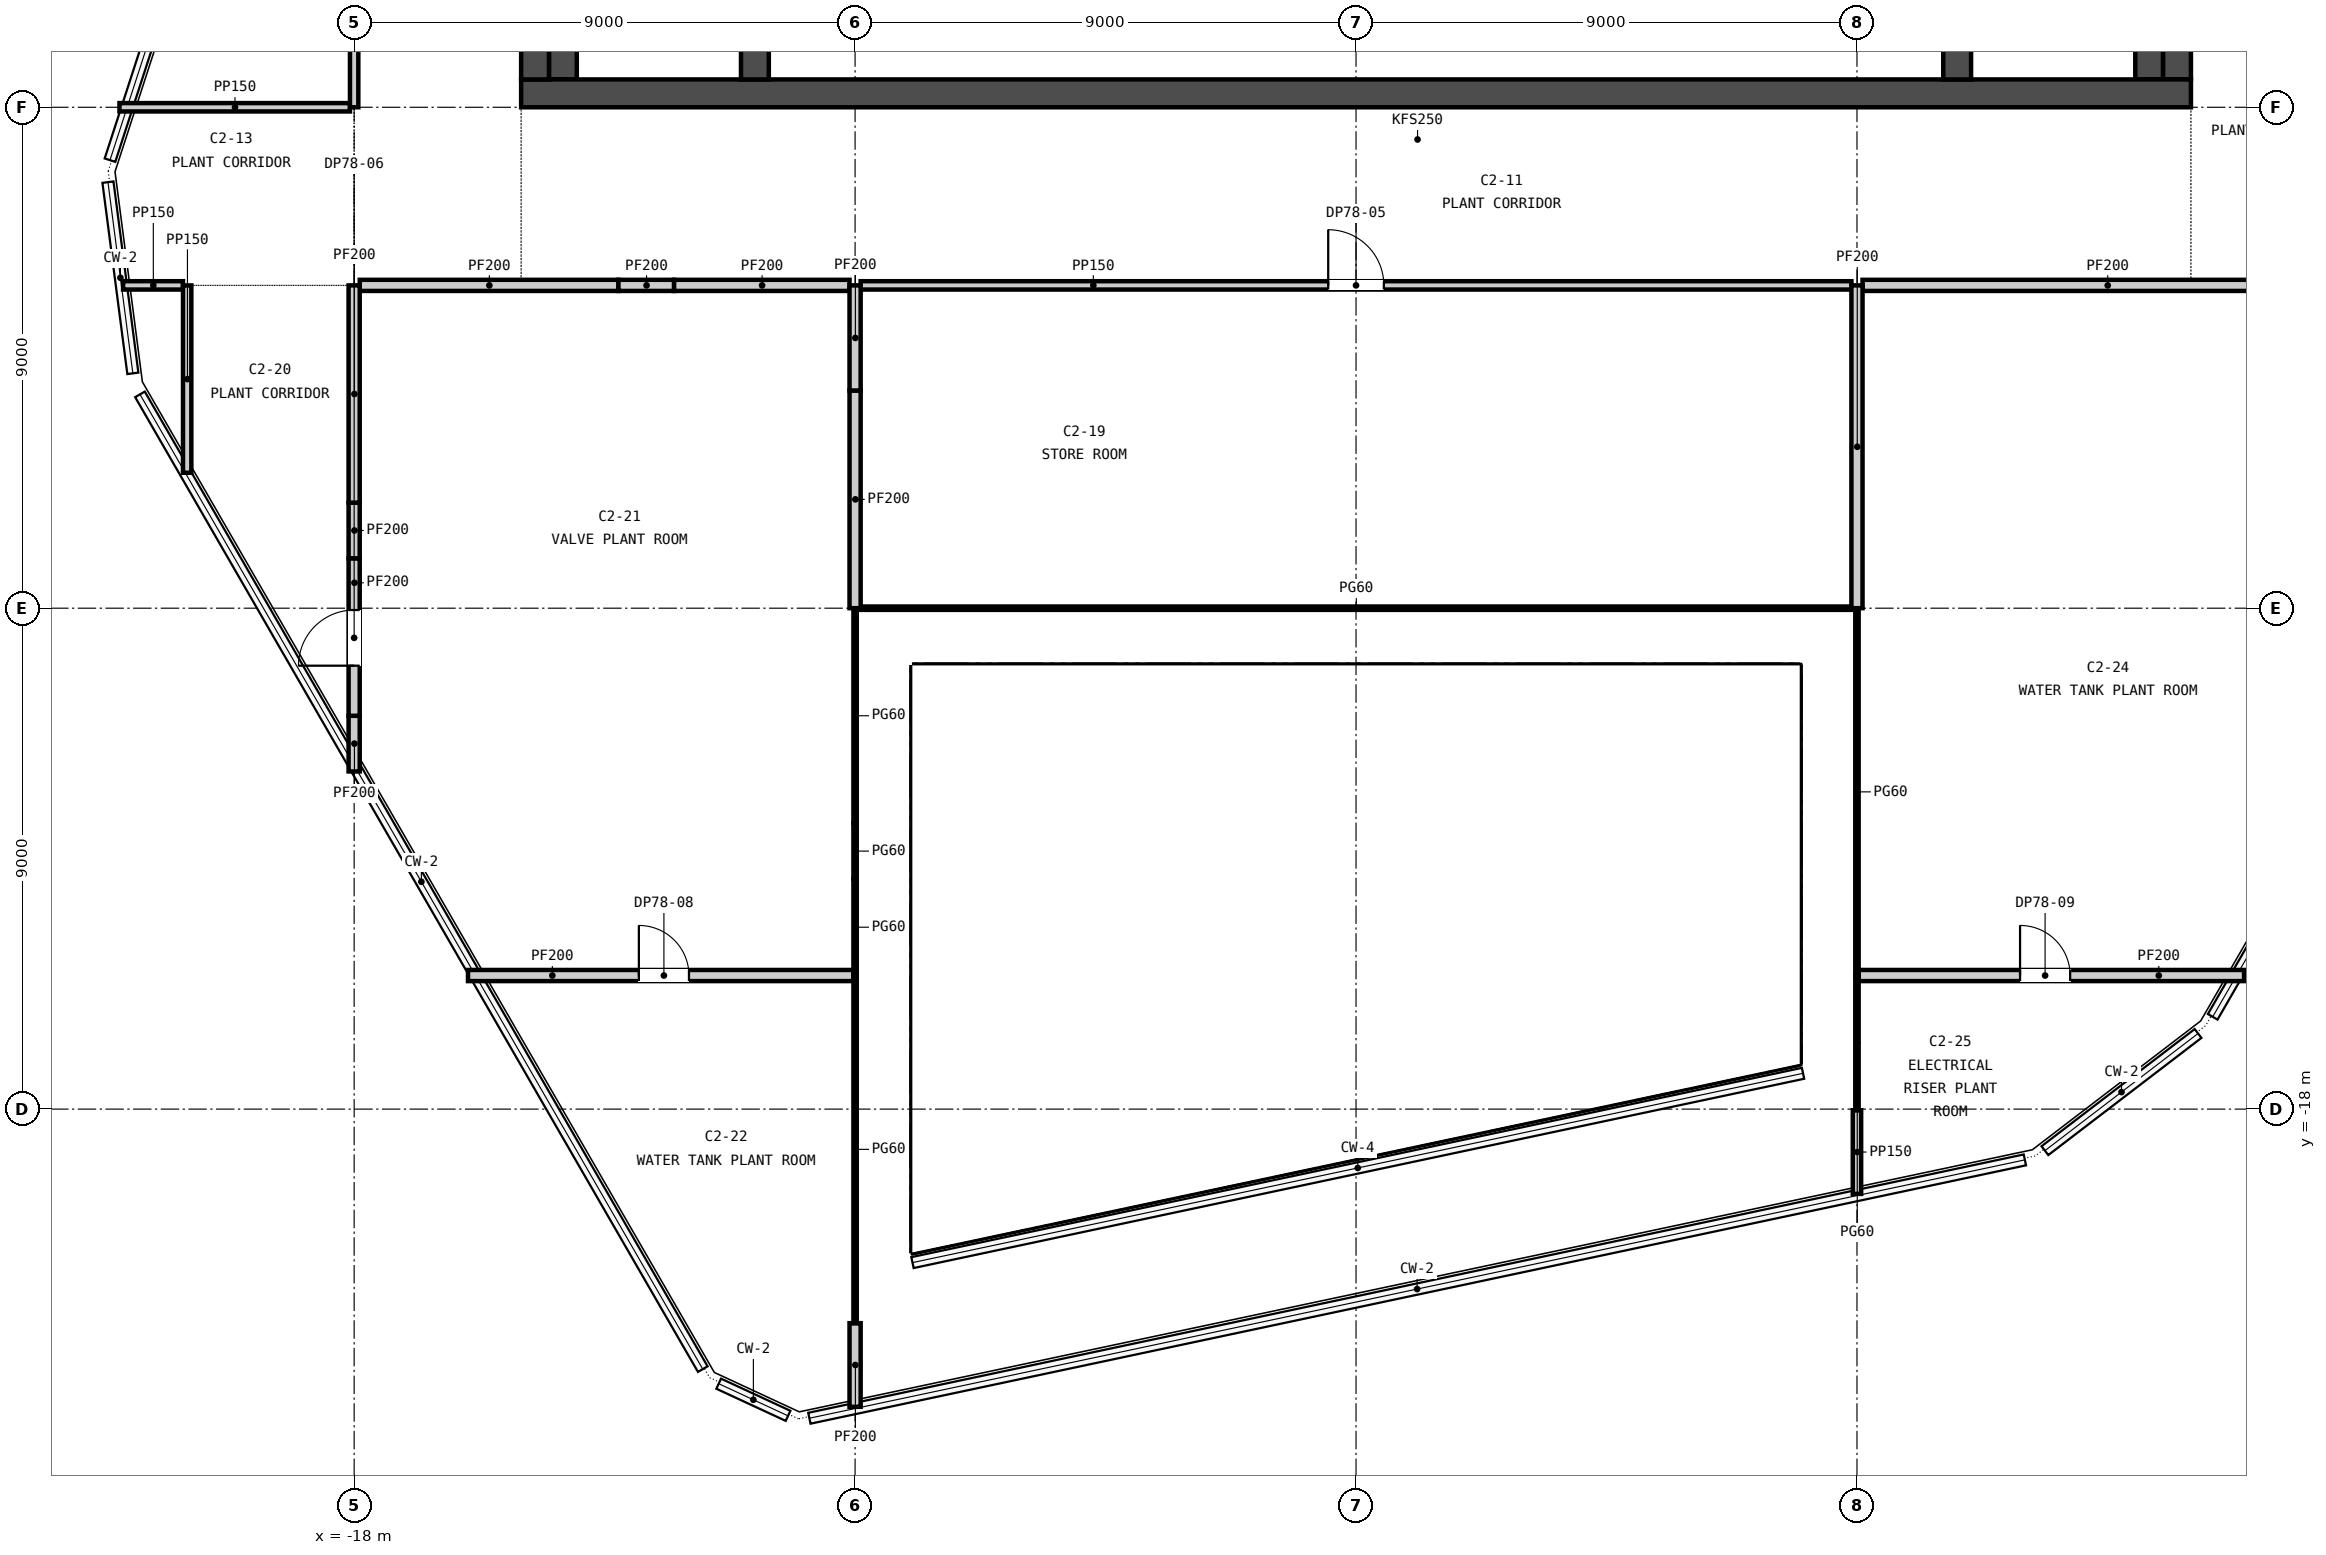
"""IFC4 building model, lengths in metres.
Left out: names, types, materials, properties, quantities, classifications, styles, units other than length and angle.
Written with IfcOpenShell. Run it as: python <this file> out.ifc"""

import sys

from ifc_helpers import new_model, si_unit, direction, frame, frame_2d, origin, place, context, subcontext, project, spatial, rectangle, extrude, element, fill, save


model = new_model("IFC4")
c1 = context("Model", 3, precision=1e-05, world=origin(), true_north=direction((0.0, 1.0)))
c2 = subcontext(c1, "Body", "Model", "MODEL_VIEW")
j1 = project(units=[si_unit("LENGTHUNIT", "METRE"), si_unit("PLANEANGLEUNIT", "RADIAN")], contexts=[c1])
p1 = place(None, origin())
s1 = spatial("IfcSite", under=j1, at=p1, CompositionType="ELEMENT")
p2 = place(p1, origin())
s2 = spatial("IfcBuilding", under=s1, at=p2, CompositionType="ELEMENT")
p3 = place(p2, frame((0.0, 0.0, 306.1)))
s3 = spatial("IfcBuildingStorey", under=s2, at=p3, CompositionType="ELEMENT", Elevation=306.1)
p4 = place(p3, frame((-15.0, 0.25, -0.25), z_axis=(0.0, 0.0, 1.0), x_axis=(1.0, 0.0, 0.0)))
e1 = element("IfcWall", 1, at=p4, inside=s3, PredefinedType="SOLIDWALL", context=c2, shape_type="SweptSolid", body=[
    extrude(rectangle(XDim=30.0, YDim=0.5, at=frame_2d((15.0, 0.0))), origin(), (0.0, 0.0, 1.0), 5.0),
])
for number, where, z_axis, x_axis in (
    (2, (-14.75, 0.5, -0.25), (0.0, 0.0, 1.0), (0.0, 1.0, 0.0)),
    (3, (14.75, 0.5, -0.25), (0.0, 0.0, 1.0), (0.0, 1.0, 0.0)),
    (4, (-10.8, 0.5, -0.25), (0.0, 0.0, 1.0), (0.0, 1.0, 0.0)),
    (5, (10.8, 0.5, -0.25), (0.0, 0.0, 1.0), (0.0, 1.0, 0.0)),
):
    element("IfcWall", number, at=place(p3, frame(where, z_axis=z_axis, x_axis=x_axis)), inside=s3, PredefinedType="SOLIDWALL", context=c2, shape_type="SweptSolid", body=[
        extrude(rectangle(XDim=14.0, YDim=0.5, at=frame_2d((7.0, 0.0))), origin(), (0.0, 0.0, 1.0), 5.0),
    ])
for number, where, z_axis, x_axis in (
    (6, (-14.25, 0.5, 0.0), (0.0, 0.0, 1.0), (0.0, 1.0, 0.0)),
    (7, (14.25, 0.5, 0.0), (0.0, 0.0, 1.0), (0.0, 1.0, 0.0)),
):
    element("IfcWall", number, at=place(p3, frame(where, z_axis=z_axis, x_axis=x_axis)), inside=s3, PredefinedType="SOLIDWALL", context=c2, shape_type="SweptSolid", body=[
        extrude(rectangle(XDim=14.0, YDim=0.5, at=frame_2d((7.0, 0.0))), origin(), (0.0, 0.0, 1.0), 4.75),
    ])
p5 = place(p3, frame((-15.955, -15.6, 0.0), z_axis=(0.0, 0.0, 1.0), x_axis=(1.0, 0.0, 0.0)))
e8 = element("IfcWall", 8, at=p5, inside=s3, PredefinedType="PARTITIONING", context=c2, shape_type="SweptSolid", body=[
    extrude(rectangle(XDim=6.925, YDim=0.2, at=frame_2d((3.462, 0.0))), origin(), (0.0, 0.0, 1.0), 4.75),
])
p6 = place(p5, frame((3.07, 0.0, 0.0)))
e9 = element("IfcOpeningElement", 9, at=p6, cuts=e8, PredefinedType="OPENING", context=c2, shape_type="SweptSolid", body=[
    extrude(rectangle(XDim=0.9, YDim=2.1, at=frame_2d((0.45, 1.05))), frame((0.0, 0.11, 0.0), z_axis=(0.0, -1.0, 0.0), x_axis=(1.0, 0.0, 0.0)), (0.0, 0.0, 1.0), 0.22),
])
p7 = place(p3, frame((9.03, -15.6, 0.0), z_axis=(0.0, 0.0, 1.0), x_axis=(1.0, 0.0, 0.0)))
e10 = element("IfcWall", 10, at=p7, inside=s3, PredefinedType="PARTITIONING", context=c2, shape_type="SweptSolid", body=[
    extrude(rectangle(XDim=6.925, YDim=0.2, at=frame_2d((3.462, 0.0))), origin(), (0.0, 0.0, 1.0), 4.75),
])
p8 = place(p7, frame((2.9, 0.0, 0.0)))
e11 = element("IfcOpeningElement", 11, at=p8, cuts=e10, PredefinedType="OPENING", context=c2, shape_type="SweptSolid", body=[
    extrude(rectangle(XDim=0.9, YDim=2.1, at=frame_2d((0.45, 1.05))), frame((0.0, 0.11, 0.0), z_axis=(0.0, -1.0, 0.0), x_axis=(1.0, 0.0, 0.0)), (0.0, 0.0, 1.0), 0.22),
])
p9 = place(p3, frame((-8.9, -9.0, 0.0), z_axis=(0.0, 0.0, 1.0), x_axis=(1.0, 0.0, 0.0)))
e12 = element("IfcWall", 12, at=p9, inside=s3, PredefinedType="PARTITIONING", context=c2, shape_type="SweptSolid", body=[
    extrude(rectangle(XDim=17.8, YDim=0.06, at=frame_2d((8.9, 0.0))), origin(), (0.0, 0.0, 1.0), 4.75),
])
p10 = place(p3, frame((-22.151, -3.2, 0.0), z_axis=(0.0, 0.0, 1.0), x_axis=(1.0, 0.0, 0.0)))
e13 = element("IfcWall", 13, at=p10, inside=s3, PredefinedType="PARTITIONING", context=c2, shape_type="SweptSolid", body=[
    extrude(rectangle(XDim=1.076, YDim=0.15, at=frame_2d((0.538, 0.0))), origin(), (0.0, 0.0, 1.0), 4.15),
])
p11 = place(p3, frame((-17.9, -3.2, 0.0), z_axis=(0.0, 0.0, 1.0), x_axis=(1.0, 0.0, 0.0)))
e14 = element("IfcWall", 14, at=p11, inside=s3, PredefinedType="PARTITIONING", context=c2, shape_type="SweptSolid", body=[
    extrude(rectangle(XDim=4.648, YDim=0.2, at=frame_2d((2.324, 0.0))), origin(), (0.0, 0.0, 1.0), 4.75),
])
p12 = place(p3, frame((-13.252, -3.2, 0.0), z_axis=(0.0, 0.0, 1.0), x_axis=(1.0, 0.0, 0.0)))
e15 = element("IfcWall", 15, at=p12, inside=s3, PredefinedType="PARTITIONING", context=c2, shape_type="SweptSolid", body=[
    extrude(rectangle(XDim=1.0, YDim=0.2, at=frame_2d((0.5, 0.0))), origin(), (0.0, 0.0, 1.0), 4.0),
])
p13 = place(p3, frame((-12.252, -3.2, 0.0), z_axis=(0.0, 0.0, 1.0), x_axis=(1.0, 0.0, 0.0)))
e16 = element("IfcWall", 16, at=p13, inside=s3, PredefinedType="PARTITIONING", context=c2, shape_type="SweptSolid", body=[
    extrude(rectangle(XDim=3.152, YDim=0.2, at=frame_2d((1.576, 0.0))), origin(), (0.0, 0.0, 1.0), 4.75),
])
p14 = place(p3, frame((-8.9, -3.2, 0.0), z_axis=(0.0, 0.0, 1.0), x_axis=(1.0, 0.0, 0.0)))
e17 = element("IfcWall", 17, at=p14, inside=s3, PredefinedType="PARTITIONING", context=c2, shape_type="SweptSolid", body=[
    extrude(rectangle(XDim=17.8, YDim=0.15, at=frame_2d((8.9, 0.0))), origin(), (0.0, 0.0, 1.0), 4.75),
])
p15 = place(p14, frame((8.4, 0.0, 0.0)))
e18 = element("IfcOpeningElement", 18, at=p15, cuts=e17, PredefinedType="OPENING", context=c2, shape_type="SweptSolid", body=[
    extrude(rectangle(XDim=1.0, YDim=2.1, at=frame_2d((0.5, 1.05))), frame((0.0, 0.085, 0.0), z_axis=(0.0, -1.0, 0.0), x_axis=(1.0, 0.0, 0.0)), (0.0, 0.0, 1.0), 0.17),
])
p16 = place(p3, frame((9.1, -3.2, 0.0), z_axis=(0.0, 0.0, 1.0), x_axis=(1.0, 0.0, 0.0)))
e19 = element("IfcWall", 19, at=p16, inside=s3, PredefinedType="PARTITIONING", context=c2, shape_type="SweptSolid", body=[
    extrude(rectangle(XDim=8.8, YDim=0.2, at=frame_2d((4.4, 0.0))), origin(), (0.0, 0.0, 1.0), 4.75),
])
p17 = place(p3, frame((-22.216, 0.0, 0.0), z_axis=(0.0, 0.0, 1.0), x_axis=(1.0, 0.0, 0.0)))
e20 = element("IfcWall", 20, at=p17, inside=s3, PredefinedType="PARTITIONING", context=c2, shape_type="SweptSolid", body=[
    extrude(rectangle(XDim=4.141, YDim=0.15, at=frame_2d((2.071, 0.0))), origin(), (0.0, 0.0, 1.0), 4.75),
])
p18 = place(p3, frame((-21.0, -6.567, 0.0), z_axis=(0.0, 0.0, 1.0), x_axis=(0.0, 1.0, 0.0)))
e21 = element("IfcWall", 21, at=p18, inside=s3, PredefinedType="PARTITIONING", context=c2, shape_type="SweptSolid", body=[
    extrude(rectangle(XDim=3.366, YDim=0.15, at=frame_2d((1.683, 0.0))), origin(), (0.0, 0.0, 1.0), 4.75),
])
p19 = place(p3, frame((-18.0, -11.933, 0.0), z_axis=(0.0, 0.0, 1.0), x_axis=(0.0, 1.0, 0.0)))
e22 = element("IfcWall", 22, at=p19, inside=s3, PredefinedType="PARTITIONING", context=c2, shape_type="SweptSolid", body=[
    extrude(rectangle(XDim=1.0, YDim=0.2, at=frame_2d((0.5, 0.0))), origin(), (0.0, 0.0, 1.0), 4.134),
])
p20 = place(p3, frame((-18.0, -10.933, 0.0), z_axis=(0.0, 0.0, 1.0), x_axis=(0.0, 1.0, 0.0)))
e23 = element("IfcWall", 23, at=p20, inside=s3, PredefinedType="PARTITIONING", context=c2, shape_type="SweptSolid", body=[
    extrude(rectangle(XDim=2.829, YDim=0.2, at=frame_2d((1.415, 0.0))), origin(), (0.0, 0.0, 1.0), 4.75),
])
p21 = place(p20, frame((0.9, 0.0, 0.0)))
e24 = element("IfcOpeningElement", 24, at=p21, cuts=e23, PredefinedType="OPENING", context=c2, shape_type="SweptSolid", body=[
    extrude(rectangle(XDim=1.0, YDim=2.1, at=frame_2d((0.5, 1.05))), frame((0.0, 0.11, 0.0), z_axis=(0.0, -1.0, 0.0), x_axis=(1.0, 0.0, 0.0)), (0.0, 0.0, 1.0), 0.22),
])
p22 = place(p3, frame((-18.0, -8.104, 0.0), z_axis=(0.0, 0.0, 1.0), x_axis=(0.0, 1.0, 0.0)))
e25 = element("IfcWall", 25, at=p22, inside=s3, PredefinedType="PARTITIONING", context=c2, shape_type="SweptSolid", body=[
    extrude(rectangle(XDim=1.0, YDim=0.2, at=frame_2d((0.5, 0.0))), origin(), (0.0, 0.0, 1.0), 4.0),
])
p23 = place(p3, frame((-18.0, -7.104, 0.0), z_axis=(0.0, 0.0, 1.0), x_axis=(0.0, 1.0, 0.0)))
e26 = element("IfcWall", 26, at=p23, inside=s3, PredefinedType="PARTITIONING", context=c2, shape_type="SweptSolid", body=[
    extrude(rectangle(XDim=3.904, YDim=0.2, at=frame_2d((1.952, 0.0))), origin(), (0.0, 0.0, 1.0), 4.75),
])
p24 = place(p3, frame((-18.0, 0.0, 0.0), z_axis=(0.0, 0.0, 1.0), x_axis=(0.0, 1.0, 0.0)))
e27 = element("IfcWall", 27, at=p24, inside=s3, PredefinedType="PARTITIONING", context=c2, shape_type="SweptSolid", body=[
    extrude(rectangle(XDim=11.624, YDim=0.15, at=frame_2d((5.812, 0.0))), origin(), (0.0, 0.0, 1.0), 4.75),
])
p25 = place(p24, frame((5.4, 0.0, 0.0)))
e28 = element("IfcOpeningElement", 28, at=p25, cuts=e27, PredefinedType="OPENING", context=c2, shape_type="SweptSolid", body=[
    extrude(rectangle(XDim=1.0, YDim=2.1, at=frame_2d((0.5, 1.05))), frame((0.0, 0.085, 0.0), z_axis=(0.0, -1.0, 0.0), x_axis=(1.0, 0.0, 0.0)), (0.0, 0.0, 1.0), 0.17),
])
p26 = place(p3, frame((-9.0, -23.349, 0.0), z_axis=(0.0, 0.0, 1.0), x_axis=(0.0, 1.0, 0.0)))
e29 = element("IfcWall", 29, at=p26, inside=s3, PredefinedType="PARTITIONING", context=c2, shape_type="SweptSolid", body=[
    extrude(rectangle(XDim=1.503, YDim=0.2, at=frame_2d((0.751, 0.0))), origin(), (0.0, 0.0, 1.0), 4.75),
])
p27 = place(p3, frame((-9.0, -21.846, 0.0), z_axis=(0.0, 0.0, 1.0), x_axis=(0.0, 1.0, 0.0)))
e30 = element("IfcWall", 30, at=p27, inside=s3, PredefinedType="PARTITIONING", context=c2, shape_type="SweptSolid", body=[
    extrude(rectangle(XDim=6.245, YDim=0.06, at=frame_2d((3.123, 0.0))), origin(), (0.0, 0.0, 1.0), 4.75),
])
p28 = place(p3, frame((-9.0, -15.599, 0.0), z_axis=(0.0, 0.0, 1.0), x_axis=(0.0, 1.0, 0.0)))
e31 = element("IfcWall", 31, at=p28, inside=s3, PredefinedType="PARTITIONING", context=c2, shape_type="SweptSolid", body=[
    extrude(rectangle(XDim=1.735, YDim=0.06, at=frame_2d((0.867, 0.0))), origin(), (0.0, 0.0, 1.0), 4.75),
])
p29 = place(p3, frame((-9.0, -13.864, 0.0), z_axis=(0.0, 0.0, 1.0), x_axis=(0.0, 1.0, 0.0)))
e32 = element("IfcWall", 32, at=p29, inside=s3, PredefinedType="PARTITIONING", context=c2, shape_type="SweptSolid", body=[
    extrude(rectangle(XDim=1.0, YDim=0.06, at=frame_2d((0.5, 0.0))), origin(), (0.0, 0.0, 1.0), 4.071),
])
p30 = place(p3, frame((-9.0, -12.864, 0.0), z_axis=(0.0, 0.0, 1.0), x_axis=(0.0, 1.0, 0.0)))
e33 = element("IfcWall", 33, at=p30, inside=s3, PredefinedType="PARTITIONING", context=c2, shape_type="SweptSolid", body=[
    extrude(rectangle(XDim=3.863, YDim=0.06, at=frame_2d((1.932, 0.0))), origin(), (0.0, 0.0, 1.0), 4.75),
])
p31 = place(p3, frame((-9.0, -9.0, 0.0), z_axis=(0.0, 0.0, 1.0), x_axis=(0.0, 1.0, 0.0)))
e34 = element("IfcWall", 34, at=p31, inside=s3, PredefinedType="PARTITIONING", context=c2, shape_type="SweptSolid", body=[
    extrude(rectangle(XDim=3.911, YDim=0.2, at=frame_2d((1.956, 0.0))), origin(), (0.0, 0.0, 1.0), 4.75),
])
p32 = place(p3, frame((-9.0, -5.089, 0.0), z_axis=(0.0, 0.0, 1.0), x_axis=(0.0, 1.0, 0.0)))
e35 = element("IfcWall", 35, at=p32, inside=s3, PredefinedType="PARTITIONING", context=c2, shape_type="SweptSolid", body=[
    extrude(rectangle(XDim=1.889, YDim=0.2, at=frame_2d((0.945, 0.0))), origin(), (0.0, 0.0, 1.0), 4.0),
])
p33 = place(p3, frame((9.0, -19.523, 0.0), z_axis=(0.0, 0.0, 1.0), x_axis=(0.0, 1.0, 0.0)))
e36 = element("IfcWall", 36, at=p33, inside=s3, PredefinedType="PARTITIONING", context=c2, shape_type="SweptSolid", body=[
    extrude(rectangle(XDim=1.503, YDim=0.15, at=frame_2d((0.751, 0.0))), origin(), (0.0, 0.0, 1.0), 4.75),
])
p34 = place(p3, frame((9.0, -18.02, 0.0), z_axis=(0.0, 0.0, 1.0), x_axis=(0.0, 1.0, 0.0)))
e37 = element("IfcWall", 37, at=p34, inside=s3, PredefinedType="PARTITIONING", context=c2, shape_type="SweptSolid", body=[
    extrude(rectangle(XDim=2.419, YDim=0.06, at=frame_2d((1.209, 0.0))), origin(), (0.0, 0.0, 1.0), 4.75),
])
p35 = place(p3, frame((9.0, -15.599, 0.0), z_axis=(0.0, 0.0, 1.0), x_axis=(0.0, 1.0, 0.0)))
e38 = element("IfcWall", 38, at=p35, inside=s3, PredefinedType="PARTITIONING", context=c2, shape_type="SweptSolid", body=[
    extrude(rectangle(XDim=6.598, YDim=0.06, at=frame_2d((3.299, 0.0))), origin(), (0.0, 0.0, 1.0), 4.75),
])
p36 = place(p3, frame((9.0, -9.0, 0.0), z_axis=(0.0, 0.0, 1.0), x_axis=(0.0, 1.0, 0.0)))
e39 = element("IfcWall", 39, at=p36, inside=s3, PredefinedType="PARTITIONING", context=c2, shape_type="SweptSolid", body=[
    extrude(rectangle(XDim=5.8, YDim=0.2, at=frame_2d((2.9, 0.0))), origin(), (0.0, 0.0, 1.0), 4.75),
])
p37 = place(p15, origin())
e40 = element("IfcDoor", 40, at=p37, inside=s3, OperationType="SINGLE_SWING_LEFT", PredefinedType="DOOR", context=c2, shape_type="SweptSolid", body=[
    extrude(rectangle(XDim=1.0, YDim=2.1, at=frame_2d((0.5, 1.05))), frame((0.0, 0.025, 0.0), z_axis=(0.0, -1.0, 0.0), x_axis=(1.0, 0.0, 0.0)), (0.0, 0.0, 1.0), 0.05),
])
fill(e18, e40)
p38 = place(p21, origin())
e41 = element("IfcDoor", 41, at=p38, inside=s3, OperationType="SINGLE_SWING_LEFT", PredefinedType="DOOR", context=c2, shape_type="SweptSolid", body=[
    extrude(rectangle(XDim=1.0, YDim=2.1, at=frame_2d((0.5, 1.05))), frame((0.0, 0.025, 0.0), z_axis=(0.0, -1.0, 0.0), x_axis=(1.0, 0.0, 0.0)), (0.0, 0.0, 1.0), 0.05),
])
fill(e24, e41)
p39 = place(p6, origin())
e42 = element("IfcDoor", 42, at=p39, inside=s3, OperationType="SINGLE_SWING_LEFT", PredefinedType="DOOR", context=c2, shape_type="SweptSolid", body=[
    extrude(rectangle(XDim=0.9, YDim=2.1, at=frame_2d((0.45, 1.05))), frame((0.0, 0.025, 0.0), z_axis=(0.0, -1.0, 0.0), x_axis=(1.0, 0.0, 0.0)), (0.0, 0.0, 1.0), 0.05),
])
fill(e9, e42)
p40 = place(p8, origin())
e43 = element("IfcDoor", 43, at=p40, inside=s3, OperationType="SINGLE_SWING_LEFT", PredefinedType="DOOR", context=c2, shape_type="SweptSolid", body=[
    extrude(rectangle(XDim=0.9, YDim=2.1, at=frame_2d((0.45, 1.05))), frame((0.0, 0.025, 0.0), z_axis=(0.0, -1.0, 0.0), x_axis=(1.0, 0.0, 0.0)), (0.0, 0.0, 1.0), 0.05),
])
fill(e11, e43)
save(model, sys.argv[1])
